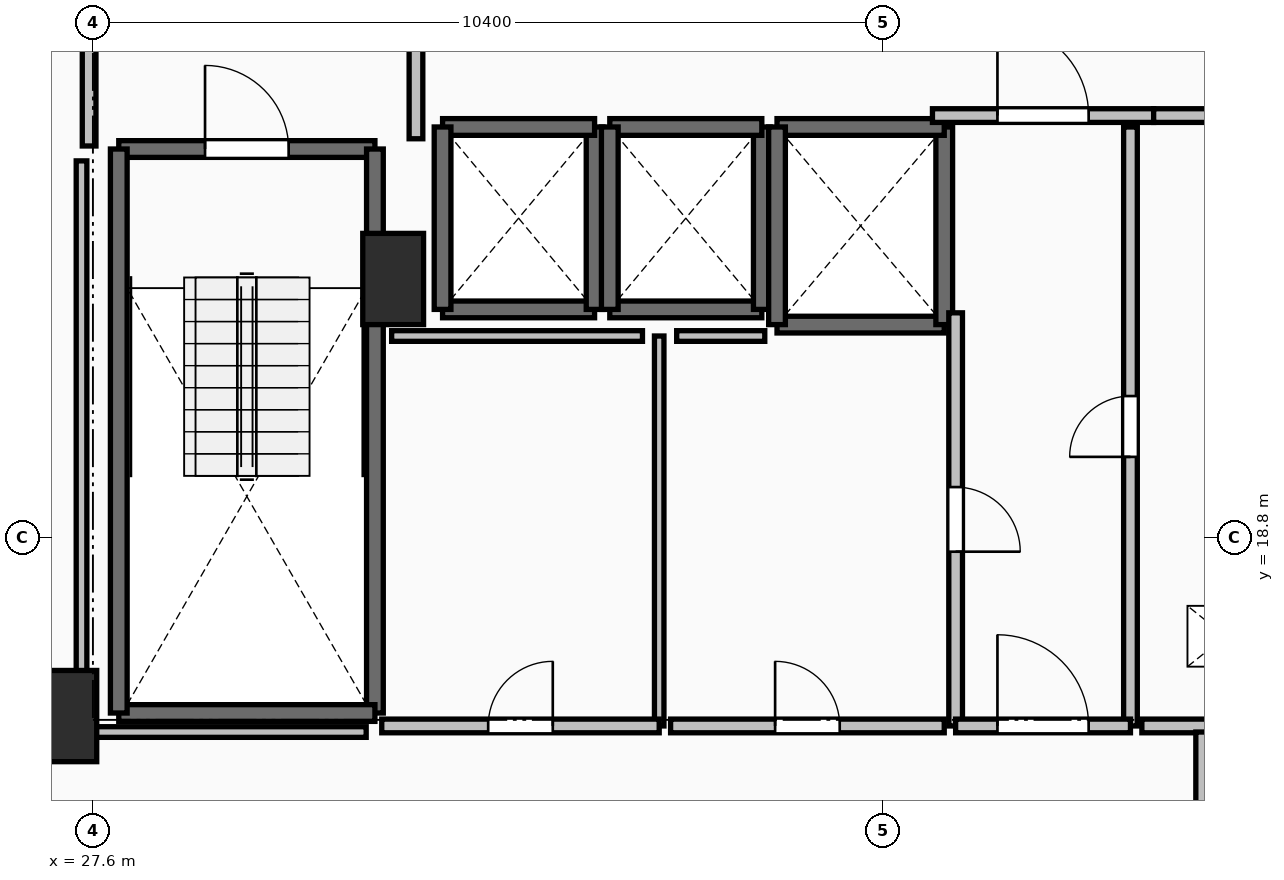
"""IFC4 building model, lengths in metres.
Left out: names, types, materials, properties, quantities, classifications, styles, units other than length and angle.
Written with IfcOpenShell. Run it as: python <this file> out.ifc"""

import sys

from ifc_helpers import new_model, si_unit, direction, frame, frame_2d, origin, origin_2d, place, context, subcontext, project, spatial, rectangle, extrude, element, fill, save


model = new_model("IFC4")
c1 = context("Model", 3, precision=1e-05, world=origin(), true_north=direction((0.0, 1.0)))
c2 = subcontext(c1, "Body", "Model", "MODEL_VIEW")
j1 = project(units=[si_unit("LENGTHUNIT", "METRE"), si_unit("PLANEANGLEUNIT", "RADIAN")], contexts=[c1])
p1 = place(None, origin())
s1 = spatial("IfcSite", under=j1, at=p1, CompositionType="ELEMENT")
p2 = place(p1, origin())
s2 = spatial("IfcBuilding", under=s1, at=p2, CompositionType="ELEMENT")
p3 = place(p2, frame((0.0, 0.0, 117.3)))
s3 = spatial("IfcBuildingStorey", under=s2, at=p3, CompositionType="ELEMENT", Elevation=117.3)
for number, where, z_axis, x_axis in (
    (1, (27.25, 16.45, 0.0), (0.0, 0.0, 1.0), (1.0, 0.0, 0.0)),
    (2, (31.55, 22.2, 0.0), (0.0, 0.0, 1.0), (1.0, 0.0, 0.0)),
):
    element("IfcColumn", number, at=place(p3, frame(where, z_axis=z_axis, x_axis=x_axis)), inside=s3, PredefinedType="PILASTER", context=c2, shape_type="SweptSolid", body=[
        extrude(rectangle(XDim=0.8, YDim=1.2, at=origin_2d()), origin(), (0.0, 0.0, 1.0), 3.5),
    ])
p4 = place(p3, frame((27.94, 23.91, 0.0), z_axis=(0.0, 0.0, 1.0), x_axis=(1.0, 0.0, 0.0)))
e3 = element("IfcWall", 3, at=p4, inside=s3, PredefinedType="SOLIDWALL", context=c2, shape_type="SweptSolid", body=[
    extrude(rectangle(XDim=3.37, YDim=0.22, at=frame_2d((1.685, 0.0))), origin(), (0.0, 0.0, 1.0), 3.24),
])
p5 = place(p4, frame((1.135, 0.0, 0.0)))
e4 = element("IfcOpeningElement", 4, at=p5, cuts=e3, PredefinedType="OPENING", context=c2, shape_type="SweptSolid", body=[
    extrude(rectangle(XDim=1.1, YDim=2.15, at=frame_2d((0.55, 1.075))), frame((0.0, 0.125, 0.0), z_axis=(0.0, -1.0, 0.0), x_axis=(1.0, 0.0, 0.0)), (0.0, 0.0, 1.0), 0.25),
])
p6 = place(p3, frame((31.31, 23.91, 0.0), z_axis=(0.0, 0.0, 1.0), x_axis=(0.0, -1.0, 0.0)))
e5 = element("IfcWall", 5, at=p6, inside=s3, PredefinedType="SOLIDWALL", context=c2, shape_type="SweptSolid", body=[
    extrude(rectangle(XDim=7.42, YDim=0.22, at=frame_2d((3.71, 0.0))), origin(), (0.0, 0.0, 1.0), 3.24),
])
p7 = place(p3, frame((31.31, 16.49, 0.0), z_axis=(0.0, 0.0, 1.0), x_axis=(-1.0, 0.0, 0.0)))
e6 = element("IfcWall", 6, at=p7, inside=s3, PredefinedType="SOLIDWALL", context=c2, shape_type="SweptSolid", body=[
    extrude(rectangle(XDim=3.37, YDim=0.22, at=frame_2d((1.685, 0.0))), origin(), (0.0, 0.0, 1.0), 3.24),
])
p8 = place(p3, frame((27.94, 16.49, 0.0), z_axis=(0.0, 0.0, 1.0), x_axis=(0.0, 1.0, 0.0)))
e7 = element("IfcWall", 7, at=p8, inside=s3, PredefinedType="SOLIDWALL", context=c2, shape_type="SweptSolid", body=[
    extrude(rectangle(XDim=7.42, YDim=0.22, at=frame_2d((3.71, 0.0))), origin(), (0.0, 0.0, 1.0), 3.24),
])
p9 = place(p3, frame((32.2, 21.8, 0.0), z_axis=(0.0, 0.0, 1.0), x_axis=(1.0, 0.0, 0.0)))
e8 = element("IfcWall", 8, at=p9, inside=s3, PredefinedType="SOLIDWALL", context=c2, shape_type="SweptSolid", body=[
    extrude(rectangle(XDim=2.0, YDim=0.22, at=frame_2d((1.0, 0.0))), origin(), (0.0, 0.0, 1.0), 3.24),
])
p10 = place(p3, frame((34.2, 21.8, 0.0), z_axis=(0.0, 0.0, 1.0), x_axis=(0.0, 1.0, 0.0)))
e9 = element("IfcWall", 9, at=p10, inside=s3, PredefinedType="SOLIDWALL", context=c2, shape_type="SweptSolid", body=[
    extrude(rectangle(XDim=2.4, YDim=0.22, at=frame_2d((1.2, 0.0))), origin(), (0.0, 0.0, 1.0), 3.24),
])
p11 = place(p3, frame((34.2, 24.2, 0.0), z_axis=(0.0, 0.0, 1.0), x_axis=(-1.0, 0.0, 0.0)))
e10 = element("IfcWall", 10, at=p11, inside=s3, PredefinedType="SOLIDWALL", context=c2, shape_type="SweptSolid", body=[
    extrude(rectangle(XDim=2.0, YDim=0.22, at=frame_2d((1.0, 0.0))), origin(), (0.0, 0.0, 1.0), 3.24),
])
p12 = place(p3, frame((32.2, 24.2, 0.0), z_axis=(0.0, 0.0, 1.0), x_axis=(0.0, -1.0, 0.0)))
e11 = element("IfcWall", 11, at=p12, inside=s3, PredefinedType="SOLIDWALL", context=c2, shape_type="SweptSolid", body=[
    extrude(rectangle(XDim=2.4, YDim=0.22, at=frame_2d((1.2, 0.0))), origin(), (0.0, 0.0, 1.0), 3.24),
])
p13 = place(p3, frame((34.4, 21.8, 0.0), z_axis=(0.0, 0.0, 1.0), x_axis=(1.0, 0.0, 0.0)))
e12 = element("IfcWall", 12, at=p13, inside=s3, PredefinedType="SOLIDWALL", context=c2, shape_type="SweptSolid", body=[
    extrude(rectangle(XDim=2.0, YDim=0.22, at=frame_2d((1.0, 0.0))), origin(), (0.0, 0.0, 1.0), 3.24),
])
p14 = place(p3, frame((36.4, 21.8, 0.0), z_axis=(0.0, 0.0, 1.0), x_axis=(0.0, 1.0, 0.0)))
e13 = element("IfcWall", 13, at=p14, inside=s3, PredefinedType="SOLIDWALL", context=c2, shape_type="SweptSolid", body=[
    extrude(rectangle(XDim=2.4, YDim=0.22, at=frame_2d((1.2, 0.0))), origin(), (0.0, 0.0, 1.0), 3.24),
])
p15 = place(p3, frame((36.4, 24.2, 0.0), z_axis=(0.0, 0.0, 1.0), x_axis=(-1.0, 0.0, 0.0)))
e14 = element("IfcWall", 14, at=p15, inside=s3, PredefinedType="SOLIDWALL", context=c2, shape_type="SweptSolid", body=[
    extrude(rectangle(XDim=2.0, YDim=0.22, at=frame_2d((1.0, 0.0))), origin(), (0.0, 0.0, 1.0), 3.24),
])
p16 = place(p3, frame((34.4, 24.2, 0.0), z_axis=(0.0, 0.0, 1.0), x_axis=(0.0, -1.0, 0.0)))
e15 = element("IfcWall", 15, at=p16, inside=s3, PredefinedType="SOLIDWALL", context=c2, shape_type="SweptSolid", body=[
    extrude(rectangle(XDim=2.4, YDim=0.22, at=frame_2d((1.2, 0.0))), origin(), (0.0, 0.0, 1.0), 3.24),
])
p17 = place(p3, frame((36.6, 21.6, 0.0), z_axis=(0.0, 0.0, 1.0), x_axis=(1.0, 0.0, 0.0)))
e16 = element("IfcWall", 16, at=p17, inside=s3, PredefinedType="SOLIDWALL", context=c2, shape_type="SweptSolid", body=[
    extrude(rectangle(XDim=2.2, YDim=0.22, at=frame_2d((1.1, 0.0))), origin(), (0.0, 0.0, 1.0), 3.24),
])
p18 = place(p3, frame((38.8, 21.6, 0.0), z_axis=(0.0, 0.0, 1.0), x_axis=(0.0, 1.0, 0.0)))
e17 = element("IfcWall", 17, at=p18, inside=s3, PredefinedType="SOLIDWALL", context=c2, shape_type="SweptSolid", body=[
    extrude(rectangle(XDim=2.6, YDim=0.22, at=frame_2d((1.3, 0.0))), origin(), (0.0, 0.0, 1.0), 3.24),
])
p19 = place(p3, frame((38.8, 24.2, 0.0), z_axis=(0.0, 0.0, 1.0), x_axis=(-1.0, 0.0, 0.0)))
e18 = element("IfcWall", 18, at=p19, inside=s3, PredefinedType="SOLIDWALL", context=c2, shape_type="SweptSolid", body=[
    extrude(rectangle(XDim=2.2, YDim=0.22, at=frame_2d((1.1, 0.0))), origin(), (0.0, 0.0, 1.0), 3.24),
])
p20 = place(p3, frame((36.6, 24.2, 0.0), z_axis=(0.0, 0.0, 1.0), x_axis=(0.0, -1.0, 0.0)))
e19 = element("IfcWall", 19, at=p20, inside=s3, PredefinedType="SOLIDWALL", context=c2, shape_type="SweptSolid", body=[
    extrude(rectangle(XDim=2.6, YDim=0.22, at=frame_2d((1.3, 0.0))), origin(), (0.0, 0.0, 1.0), 3.24),
])
p21 = place(p3, frame((31.85, 24.045, 0.0), z_axis=(0.0, 0.0, 1.0), x_axis=(0.0, 1.0, 0.0)))
e20 = element("IfcWall", 20, at=p21, inside=s3, PredefinedType="PARTITIONING", context=c2, shape_type="SweptSolid", body=[
    extrude(rectangle(XDim=3.91, YDim=0.18, at=frame_2d((1.955, 0.0))), origin(), (0.0, 0.0, 1.0), 3.24),
])
p22 = place(p21, frame((1.355, 0.0, 0.0)))
e21 = element("IfcOpeningElement", 21, at=p22, cuts=e20, PredefinedType="OPENING", context=c2, shape_type="SweptSolid", body=[
    extrude(rectangle(XDim=1.2, YDim=2.15, at=frame_2d((0.6, 1.075))), frame((0.0, 0.105, 0.0), z_axis=(0.0, -1.0, 0.0), x_axis=(1.0, 0.0, 0.0)), (0.0, 0.0, 1.0), 0.21),
])
p23 = place(p3, frame((27.55, 28.0, 0.0), z_axis=(0.0, 0.0, 1.0), x_axis=(0.0, -1.0, 0.0)))
e22 = element("IfcWall", 22, at=p23, inside=s3, PredefinedType="PARTITIONING", context=c2, shape_type="SweptSolid", body=[
    extrude(rectangle(XDim=4.05, YDim=0.18, at=frame_2d((2.025, 0.0))), origin(), (0.0, 0.0, 1.0), 3.24),
])
p24 = place(p23, frame((1.425, 0.0, 0.0)))
e23 = element("IfcOpeningElement", 23, at=p24, cuts=e22, PredefinedType="OPENING", context=c2, shape_type="SweptSolid", body=[
    extrude(rectangle(XDim=1.2, YDim=2.15, at=frame_2d((0.6, 1.075))), frame((0.0, 0.105, 0.0), z_axis=(0.0, -1.0, 0.0), x_axis=(1.0, 0.0, 0.0)), (0.0, 0.0, 1.0), 0.21),
])
p25 = place(p3, frame((38.645, 24.35, 0.0), z_axis=(0.0, 0.0, 1.0), x_axis=(1.0, 0.0, 0.0)))
e24 = element("IfcWall", 24, at=p25, inside=s3, PredefinedType="PARTITIONING", context=c2, shape_type="SweptSolid", body=[
    extrude(rectangle(XDim=2.91, YDim=0.18, at=frame_2d((1.455, 0.0))), origin(), (0.0, 0.0, 1.0), 3.24),
])
p26 = place(p25, frame((0.855, 0.0, 0.0)))
e25 = element("IfcOpeningElement", 25, at=p26, cuts=e24, PredefinedType="OPENING", context=c2, shape_type="SweptSolid", body=[
    extrude(rectangle(XDim=1.2, YDim=2.15, at=frame_2d((0.6, 1.075))), frame((0.0, 0.105, 0.0), z_axis=(0.0, -1.0, 0.0), x_axis=(1.0, 0.0, 0.0)), (0.0, 0.0, 1.0), 0.21),
])
p27 = place(p3, frame((41.555, 24.35, 0.0), z_axis=(0.0, 0.0, 1.0), x_axis=(1.0, 0.0, 0.0)))
e26 = element("IfcWall", 26, at=p27, inside=s3, PredefinedType="PARTITIONING", context=c2, shape_type="SweptSolid", body=[
    extrude(rectangle(XDim=2.445, YDim=0.18, at=frame_2d((1.223, 0.0))), origin(), (0.0, 0.0, 1.0), 3.24),
])
p28 = place(p27, frame((0.823, 0.0, 0.0)))
e27 = element("IfcOpeningElement", 27, at=p28, cuts=e26, PredefinedType="OPENING", context=c2, shape_type="SweptSolid", body=[
    extrude(rectangle(XDim=0.8, YDim=2.05, at=frame_2d((0.4, 1.025))), frame((0.0, 0.105, 0.0), z_axis=(0.0, -1.0, 0.0), x_axis=(1.0, 0.0, 0.0)), (0.0, 0.0, 1.0), 0.21),
])
p29 = place(p3, frame((41.25, 16.32, 0.0), z_axis=(0.0, 0.0, 1.0), x_axis=(0.0, 1.0, 0.0)))
e28 = element("IfcWall", 28, at=p29, inside=s3, PredefinedType="PARTITIONING", context=c2, shape_type="SweptSolid", body=[
    extrude(rectangle(XDim=7.88, YDim=0.18, at=frame_2d((3.94, 0.0))), origin(), (0.0, 0.0, 1.0), 3.24),
])
p30 = place(p29, frame((3.54, 0.0, 0.0)))
e29 = element("IfcOpeningElement", 29, at=p30, cuts=e28, PredefinedType="OPENING", context=c2, shape_type="SweptSolid", body=[
    extrude(rectangle(XDim=0.8, YDim=2.05, at=frame_2d((0.4, 1.025))), frame((0.0, 0.105, 0.0), z_axis=(0.0, -1.0, 0.0), x_axis=(1.0, 0.0, 0.0)), (0.0, 0.0, 1.0), 0.21),
])
p31 = place(p3, frame((38.95, 21.755, 0.0), z_axis=(0.0, 0.0, 1.0), x_axis=(0.0, -1.0, 0.0)))
e30 = element("IfcWall", 30, at=p31, inside=s3, PredefinedType="PARTITIONING", context=c2, shape_type="SweptSolid", body=[
    extrude(rectangle(XDim=5.435, YDim=0.18, at=frame_2d((2.717, 0.0))), origin(), (0.0, 0.0, 1.0), 3.24),
])
p32 = place(p31, frame((2.292, 0.0, 0.0)))
e31 = element("IfcOpeningElement", 31, at=p32, cuts=e30, PredefinedType="OPENING", context=c2, shape_type="SweptSolid", body=[
    extrude(rectangle(XDim=0.85, YDim=2.1, at=frame_2d((0.425, 1.05))), frame((0.0, 0.105, 0.0), z_axis=(0.0, -1.0, 0.0), x_axis=(1.0, 0.0, 0.0)), (0.0, 0.0, 1.0), 0.21),
])
p33 = place(p3, frame((38.95, 16.32, 0.0), z_axis=(0.0, 0.0, 1.0), x_axis=(1.0, 0.0, 0.0)))
e32 = element("IfcWall", 32, at=p33, inside=s3, PredefinedType="PARTITIONING", context=c2, shape_type="SweptSolid", body=[
    extrude(rectangle(XDim=2.3, YDim=0.18, at=frame_2d((1.15, 0.0))), origin(), (0.0, 0.0, 1.0), 3.24),
])
p34 = place(p33, frame((0.55, 0.0, 0.0)))
e33 = element("IfcOpeningElement", 33, at=p34, cuts=e32, PredefinedType="OPENING", context=c2, shape_type="SweptSolid", body=[
    extrude(rectangle(XDim=1.2, YDim=2.15, at=frame_2d((0.6, 1.075))), frame((0.0, 0.105, 0.0), z_axis=(0.0, -1.0, 0.0), x_axis=(1.0, 0.0, 0.0)), (0.0, 0.0, 1.0), 0.21),
])
p35 = place(p3, frame((41.4, 16.32, 0.0), z_axis=(0.0, 0.0, 1.0), x_axis=(1.0, 0.0, 0.0)))
e34 = element("IfcWall", 34, at=p35, inside=s3, PredefinedType="PARTITIONING", context=c2, shape_type="SweptSolid", body=[
    extrude(rectangle(XDim=3.2, YDim=0.18, at=frame_2d((1.6, 0.0))), origin(), (0.0, 0.0, 1.0), 3.24),
])
p36 = place(p35, frame((1.2, 0.0, 0.0)))
e35 = element("IfcOpeningElement", 35, at=p36, cuts=e34, PredefinedType="OPENING", context=c2, shape_type="SweptSolid", body=[
    extrude(rectangle(XDim=0.8, YDim=2.05, at=frame_2d((0.4, 1.025))), frame((0.0, 0.105, 0.0), z_axis=(0.0, -1.0, 0.0), x_axis=(1.0, 0.0, 0.0)), (0.0, 0.0, 1.0), 0.21),
])
p37 = place(p3, frame((35.05, 16.32, 0.0), z_axis=(0.0, 0.0, 1.0), x_axis=(0.0, 1.0, 0.0)))
e36 = element("IfcWall", 36, at=p37, inside=s3, PredefinedType="PARTITIONING", context=c2, shape_type="SweptSolid", body=[
    extrude(rectangle(XDim=5.13, YDim=0.125, at=frame_2d((2.565, 0.0))), origin(), (0.0, 0.0, 1.0), 3.24),
])
p38 = place(p3, frame((31.4, 16.32, 0.0), z_axis=(0.0, 0.0, 1.0), x_axis=(1.0, 0.0, 0.0)))
e37 = element("IfcWall", 37, at=p38, inside=s3, PredefinedType="PARTITIONING", context=c2, shape_type="SweptSolid", body=[
    extrude(rectangle(XDim=3.65, YDim=0.18, at=frame_2d((1.825, 0.0))), origin(), (0.0, 0.0, 1.0), 3.24),
])
p39 = place(p38, frame((1.4, 0.0, 0.0)))
e38 = element("IfcOpeningElement", 38, at=p39, cuts=e37, PredefinedType="OPENING", context=c2, shape_type="SweptSolid", body=[
    extrude(rectangle(XDim=0.85, YDim=2.1, at=frame_2d((0.425, 1.05))), frame((0.0, 0.105, 0.0), z_axis=(0.0, -1.0, 0.0), x_axis=(1.0, 0.0, 0.0)), (0.0, 0.0, 1.0), 0.21),
])
p40 = place(p3, frame((35.2, 16.32, 0.0), z_axis=(0.0, 0.0, 1.0), x_axis=(1.0, 0.0, 0.0)))
e39 = element("IfcWall", 39, at=p40, inside=s3, PredefinedType="PARTITIONING", context=c2, shape_type="SweptSolid", body=[
    extrude(rectangle(XDim=3.6, YDim=0.18, at=frame_2d((1.8, 0.0))), origin(), (0.0, 0.0, 1.0), 3.24),
])
p41 = place(p40, frame((1.375, 0.0, 0.0)))
e40 = element("IfcOpeningElement", 40, at=p41, cuts=e39, PredefinedType="OPENING", context=c2, shape_type="SweptSolid", body=[
    extrude(rectangle(XDim=0.85, YDim=2.1, at=frame_2d((0.425, 1.05))), frame((0.0, 0.105, 0.0), z_axis=(0.0, -1.0, 0.0), x_axis=(1.0, 0.0, 0.0)), (0.0, 0.0, 1.0), 0.21),
])
p42 = place(p3, frame((42.2, 14.1, 0.0), z_axis=(0.0, 0.0, 1.0), x_axis=(0.0, 1.0, 0.0)))
e41 = element("IfcWall", 41, at=p42, inside=s3, PredefinedType="PARTITIONING", context=c2, shape_type="SweptSolid", body=[
    extrude(rectangle(XDim=2.14, YDim=0.18, at=frame_2d((1.07, 0.0))), origin(), (0.0, 0.0, 1.0), 2.874),
])
p43 = place(p3, frame((34.83, 21.45, 0.0), z_axis=(0.0, 0.0, 1.0), x_axis=(-1.0, 0.0, 0.0)))
e42 = element("IfcWall", 42, at=p43, inside=s3, PredefinedType="PARTITIONING", context=c2, shape_type="SweptSolid", body=[
    extrude(rectangle(XDim=3.3, YDim=0.14, at=frame_2d((1.65, 0.0))), origin(), (0.0, 0.0, 1.0), 3.24),
])
p44 = place(p3, frame((36.439, 21.45, 0.0), z_axis=(0.0, 0.0, 1.0), x_axis=(-1.0, 0.0, 0.0)))
e43 = element("IfcWall", 43, at=p44, inside=s3, PredefinedType="PARTITIONING", context=c2, shape_type="SweptSolid", body=[
    extrude(rectangle(XDim=1.159, YDim=0.14, at=frame_2d((0.58, 0.0))), origin(), (0.0, 0.0, 1.0), 3.24),
])
p45 = place(p3, frame((31.195, 16.24, 0.0), z_axis=(0.0, 0.0, 1.0), x_axis=(-1.0, 0.0, 0.0)))
e44 = element("IfcWall", 44, at=p45, inside=s3, PredefinedType="PARTITIONING", context=c2, shape_type="SweptSolid", body=[
    extrude(rectangle(XDim=3.745, YDim=0.14, at=frame_2d((1.873, 0.0))), origin(), (0.0, 0.0, 1.0), 2.432),
])
p46 = place(p3, frame((27.45, 16.24, 0.0), z_axis=(0.0, 0.0, 1.0), x_axis=(0.0, 1.0, 0.0)))
e45 = element("IfcWall", 45, at=p46, inside=s3, PredefinedType="PARTITIONING", context=c2, shape_type="SweptSolid", body=[
    extrude(rectangle(XDim=7.514, YDim=0.14, at=frame_2d((3.757, 0.0))), origin(), (0.0, 0.0, 1.0), 2.432),
])
p47 = place(p5, origin())
e46 = element("IfcDoor", 46, at=p47, inside=s3, OperationType="SINGLE_SWING_LEFT", PredefinedType="DOOR", context=c2, shape_type="SweptSolid", body=[
    extrude(rectangle(XDim=1.1, YDim=2.15, at=frame_2d((0.55, 1.075))), frame((0.0, 0.025, 0.0), z_axis=(0.0, -1.0, 0.0), x_axis=(1.0, 0.0, 0.0)), (0.0, 0.0, 1.0), 0.05),
])
fill(e4, e46)
p48 = place(p26, origin())
e47 = element("IfcDoor", 47, at=p48, inside=s3, OperationType="SINGLE_SWING_LEFT", PredefinedType="DOOR", context=c2, shape_type="SweptSolid", body=[
    extrude(rectangle(XDim=1.2, YDim=2.15, at=frame_2d((0.6, 1.075))), frame((0.0, 0.025, 0.0), z_axis=(0.0, -1.0, 0.0), x_axis=(1.0, 0.0, 0.0)), (0.0, 0.0, 1.0), 0.05),
])
fill(e25, e47)
p49 = place(p30, origin())
e48 = element("IfcDoor", 48, at=p49, inside=s3, OperationType="SINGLE_SWING_LEFT", PredefinedType="DOOR", context=c2, shape_type="SweptSolid", body=[
    extrude(rectangle(XDim=0.8, YDim=2.05, at=frame_2d((0.4, 1.025))), frame((0.0, 0.025, 0.0), z_axis=(0.0, -1.0, 0.0), x_axis=(1.0, 0.0, 0.0)), (0.0, 0.0, 1.0), 0.05),
])
fill(e29, e48)
p50 = place(p32, origin())
e49 = element("IfcDoor", 49, at=p50, inside=s3, OperationType="SINGLE_SWING_RIGHT", PredefinedType="DOOR", context=c2, shape_type="SweptSolid", body=[
    extrude(rectangle(XDim=0.85, YDim=2.1, at=frame_2d((0.425, 1.05))), frame((0.0, 0.025, 0.0), z_axis=(0.0, -1.0, 0.0), x_axis=(1.0, 0.0, 0.0)), (0.0, 0.0, 1.0), 0.05),
])
fill(e31, e49)
p51 = place(p34, origin())
e50 = element("IfcDoor", 50, at=p51, inside=s3, OperationType="SINGLE_SWING_LEFT", PredefinedType="DOOR", context=c2, shape_type="SweptSolid", body=[
    extrude(rectangle(XDim=1.2, YDim=2.15, at=frame_2d((0.6, 1.075))), frame((0.0, 0.025, 0.0), z_axis=(0.0, -1.0, 0.0), x_axis=(1.0, 0.0, 0.0)), (0.0, 0.0, 1.0), 0.05),
])
fill(e33, e50)
p52 = place(p39, origin())
e51 = element("IfcDoor", 51, at=p52, inside=s3, OperationType="SINGLE_SWING_RIGHT", PredefinedType="DOOR", context=c2, shape_type="SweptSolid", body=[
    extrude(rectangle(XDim=0.85, YDim=2.1, at=frame_2d((0.425, 1.05))), frame((0.0, 0.025, 0.0), z_axis=(0.0, -1.0, 0.0), x_axis=(1.0, 0.0, 0.0)), (0.0, 0.0, 1.0), 0.05),
])
fill(e38, e51)
p53 = place(p41, origin())
e52 = element("IfcDoor", 52, at=p53, inside=s3, OperationType="SINGLE_SWING_LEFT", PredefinedType="DOOR", context=c2, shape_type="SweptSolid", body=[
    extrude(rectangle(XDim=0.85, YDim=2.1, at=frame_2d((0.425, 1.05))), frame((0.0, 0.025, 0.0), z_axis=(0.0, -1.0, 0.0), x_axis=(1.0, 0.0, 0.0)), (0.0, 0.0, 1.0), 0.05),
])
fill(e40, e52)
save(model, sys.argv[1])
